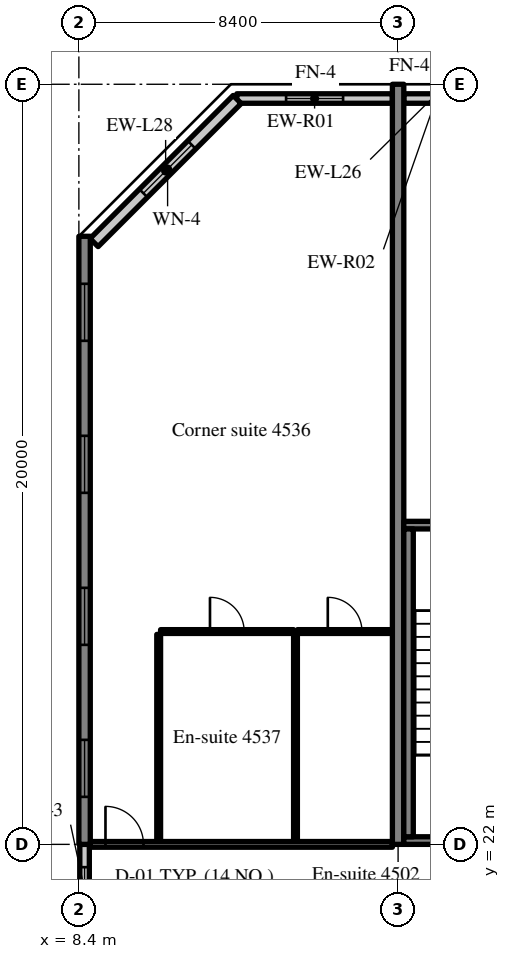
"""IFC4 building model, lengths in metres.
Left out: names, types, materials, properties, quantities, classifications, styles, units other than length and angle.
Written with IfcOpenShell. Run it as: python <this file> out.ifc"""

import sys

from ifc_helpers import new_model, si_unit, direction, frame, frame_2d, origin, place, context, subcontext, project, spatial, rectangle, extrude, source, transform, mapped, element, fill, save


model = new_model("IFC4")
c1 = context("Model", 3, precision=1e-05, world=origin(), true_north=direction((0.0, 1.0)))
c2 = subcontext(c1, "Body", "Model", "MODEL_VIEW")
j1 = project(units=[si_unit("LENGTHUNIT", "METRE"), si_unit("PLANEANGLEUNIT", "RADIAN")], contexts=[c1])
p1 = place(None, origin())
s1 = spatial("IfcSite", under=j1, at=p1, CompositionType="ELEMENT")
p2 = place(p1, origin())
s2 = spatial("IfcBuilding", under=s1, at=p2, CompositionType="ELEMENT")
p3 = place(p2, frame((0.0, 0.0, 185.8)))
s3 = spatial("IfcBuildingStorey", under=s2, at=p3, CompositionType="ELEMENT", Elevation=185.8)
m1 = source(origin(), c2, "Body", "SweptSolid", [
    extrude(rectangle(XDim=16.0, YDim=0.3, at=frame_2d((8.0, 0.0))), origin(), (0.0, 0.0, 1.0), 3.52),
])
p4 = place(p3, frame((8.55, 22.0, 0.0), z_axis=(0.0, 0.0, 1.0), x_axis=(0.0, 1.0, 0.0)))
e1 = element("IfcWall", 1, at=p4, inside=s3, PredefinedType="SHEAR", context=c2, shape_type="MappedRepresentation", body=[
    mapped(m1, transform((0.0, 0.0, 0.0), scale=1.0)),
])
m2 = source(origin(), c2, "Body", "SweptSolid", [
    extrude(rectangle(XDim=1.5, YDim=1.5, at=frame_2d((0.75, 0.75))), frame((0.0, 0.16, 0.0), z_axis=(0.0, -1.0, 0.0), x_axis=(1.0, 0.0, 0.0)), (0.0, 0.0, 1.0), 0.32),
])
p5 = place(p4, frame((1.25, 0.0, 0.9)))
e2 = element("IfcOpeningElement", 2, at=p5, cuts=e1, PredefinedType="OPENING", context=c2, shape_type="MappedRepresentation", body=[
    mapped(m2, transform((0.0, 0.0, 0.0), scale=1.0)),
])
p6 = place(p4, frame((5.25, 0.0, 0.9)))
e3 = element("IfcOpeningElement", 3, at=p6, cuts=e1, PredefinedType="OPENING", context=c2, shape_type="MappedRepresentation", body=[
    mapped(m2, transform((0.0, 0.0, 0.0), scale=1.0)),
])
p7 = place(p4, frame((9.25, 0.0, 0.9)))
e4 = element("IfcOpeningElement", 4, at=p7, cuts=e1, PredefinedType="OPENING", context=c2, shape_type="MappedRepresentation", body=[
    mapped(m2, transform((0.0, 0.0, 0.0), scale=1.0)),
])
p8 = place(p4, frame((13.25, 0.0, 0.9)))
e5 = element("IfcOpeningElement", 5, at=p8, cuts=e1, PredefinedType="OPENING", context=c2, shape_type="MappedRepresentation", body=[
    mapped(m2, transform((0.0, 0.0, 0.0), scale=1.0)),
])
m3 = source(origin(), c2, "Body", "SweptSolid", [
    extrude(rectangle(XDim=20.0, YDim=0.3, at=frame_2d((10.0, 0.0))), origin(), (0.0, 0.0, 1.0), 3.52),
])
p9 = place(p3, frame((16.8, 22.0, 0.0), z_axis=(0.0, 0.0, 1.0), x_axis=(0.0, 1.0, 0.0)))
e6 = element("IfcWall", 6, at=p9, inside=s3, PredefinedType="SHEAR", context=c2, shape_type="MappedRepresentation", body=[
    mapped(m3, transform((0.0, 0.0, 0.0), scale=1.0)),
])
m4 = source(origin(), c2, "Body", "SweptSolid", [
    extrude(rectangle(XDim=4.094, YDim=0.25, at=frame_2d((2.047, 0.0))), origin(), (0.0, 0.0, 1.0), 2.87),
])
p10 = place(p3, frame((16.65, 41.625, 0.0), z_axis=(0.0, 0.0, 1.0), x_axis=(-1.0, 0.0, 0.0)))
e7 = element("IfcWall", 7, at=p10, inside=s3, PredefinedType="SOLIDWALL", context=c2, shape_type="MappedRepresentation", body=[
    mapped(m4, transform((0.0, 0.0, 0.0), scale=1.0)),
])
m5 = source(origin(), c2, "Body", "SweptSolid", [
    extrude(rectangle(XDim=1.5, YDim=1.5, at=frame_2d((0.75, 0.75))), frame((0.0, 0.135, 0.0), z_axis=(0.0, -1.0, 0.0), x_axis=(1.0, 0.0, 0.0)), (0.0, 0.0, 1.0), 0.27),
])
p11 = place(p10, frame((1.297, 0.0, 0.9)))
e8 = element("IfcOpeningElement", 8, at=p11, cuts=e7, PredefinedType="OPENING", context=c2, shape_type="MappedRepresentation", body=[
    mapped(m5, transform((0.0, 0.0, 0.0), scale=1.0)),
])
m6 = source(origin(), c2, "Body", "SweptSolid", [
    extrude(rectangle(XDim=1.708, YDim=0.25, at=frame_2d((0.854, 0.0))), origin(), (0.0, 0.0, 1.0), 2.87),
])
p12 = place(p3, frame((18.658, 41.625, 0.0), z_axis=(0.0, 0.0, 1.0), x_axis=(-1.0, 0.0, 0.0)))
e9 = element("IfcWall", 9, at=p12, inside=s3, PredefinedType="SOLIDWALL", context=c2, shape_type="MappedRepresentation", body=[
    mapped(m6, transform((0.0, 0.0, 0.0), scale=1.0)),
])
m7 = source(origin(), c2, "Body", "SweptSolid", [
    extrude(rectangle(XDim=5.326, YDim=0.3, at=frame_2d((2.663, 0.0))), origin(), (0.0, 0.0, 1.0), 3.52),
])
p13 = place(p3, frame((12.566, 41.6, 0.0), z_axis=(0.0, 0.0, 1.0), x_axis=(-0.707083859269, -0.707129702361, 0.0)))
e10 = element("IfcWall", 10, at=p13, inside=s3, PredefinedType="SOLIDWALL", context=c2, shape_type="MappedRepresentation", body=[
    mapped(m7, transform((0.0, 0.0, 0.0), scale=1.0)),
])
m8 = source(origin(), c2, "Body", "SweptSolid", [
    extrude(rectangle(XDim=1.8, YDim=1.5, at=frame_2d((0.9, 0.75))), frame((0.0, 0.16, 0.0), z_axis=(0.0, -1.0, 0.0), x_axis=(1.0, 0.0, 0.0)), (0.0, 0.0, 1.0), 0.32),
])
p14 = place(p13, frame((1.689, 0.0, 0.9)))
e11 = element("IfcOpeningElement", 11, at=p14, cuts=e10, PredefinedType="OPENING", context=c2, shape_type="MappedRepresentation", body=[
    mapped(m8, transform((0.0, 0.0, 0.0), scale=1.0)),
])
m9 = source(origin(), c2, "Body", "SweptSolid", [
    extrude(rectangle(XDim=2.4, YDim=0.25, at=frame_2d((1.2, 0.0))), origin(), (0.0, 0.0, 1.0), 2.62),
])
p15 = place(p3, frame((8.55, 19.6, 0.0), z_axis=(0.0, 0.0, 1.0), x_axis=(0.0, 1.0, 0.0)))
e12 = element("IfcWall", 12, at=p15, inside=s3, PredefinedType="SOLIDWALL", context=c2, shape_type="MappedRepresentation", body=[
    mapped(m9, transform((0.0, 0.0, 0.0), scale=1.0)),
])
m10 = source(origin(), c2, "Body", "SweptSolid", [
    extrude(rectangle(XDim=1.2, YDim=1.5, at=frame_2d((0.6, 0.75))), frame((0.0, 0.135, 0.0), z_axis=(0.0, -1.0, 0.0), x_axis=(1.0, 0.0, 0.0)), (0.0, 0.0, 1.0), 0.27),
])
p16 = place(p15, frame((0.6, 0.0, 0.9)))
e13 = element("IfcOpeningElement", 13, at=p16, cuts=e12, PredefinedType="OPENING", context=c2, shape_type="MappedRepresentation", body=[
    mapped(m10, transform((0.0, 0.0, 0.0), scale=1.0)),
])
m11 = source(origin(), c2, "Body", "SweptSolid", [
    extrude(rectangle(XDim=8.25, YDim=0.2, at=frame_2d((4.125, 0.0))), origin(), (0.0, 0.0, 1.0), 3.52),
])
p17 = place(p3, frame((16.95, 22.1, 0.0), z_axis=(0.0, 0.0, 1.0), x_axis=(1.0, 0.0, 0.0)))
e14 = element("IfcWall", 14, at=p17, inside=s3, PredefinedType="SOLIDWALL", context=c2, shape_type="MappedRepresentation", body=[
    mapped(m11, transform((0.0, 0.0, 0.0), scale=1.0)),
])
m12 = source(origin(), c2, "Body", "SweptSolid", [
    extrude(rectangle(XDim=1.2, YDim=2.1, at=frame_2d((0.6, 1.05))), frame((0.0, 0.11, 0.0), z_axis=(0.0, -1.0, 0.0), x_axis=(1.0, 0.0, 0.0)), (0.0, 0.0, 1.0), 0.22),
])
p18 = place(p17, frame((6.05, 0.0, 0.0)))
e15 = element("IfcOpeningElement", 15, at=p18, cuts=e14, PredefinedType="OPENING", context=c2, shape_type="MappedRepresentation", body=[
    mapped(m12, transform((0.0, 0.0, 0.0), scale=1.0)),
])
p19 = place(p3, frame((16.95, 30.4, 0.0), z_axis=(0.0, 0.0, 1.0), x_axis=(1.0, 0.0, 0.0)))
e16 = element("IfcWall", 16, at=p19, inside=s3, PredefinedType="SOLIDWALL", context=c2, shape_type="MappedRepresentation", body=[
    mapped(m11, transform((0.0, 0.0, 0.0), scale=1.0)),
])
m13 = source(origin(), c2, "Body", "SweptSolid", [
    extrude(rectangle(XDim=1.0, YDim=2.1, at=frame_2d((0.5, 1.05))), frame((0.0, 0.11, 0.0), z_axis=(0.0, -1.0, 0.0), x_axis=(1.0, 0.0, 0.0)), (0.0, 0.0, 1.0), 0.22),
])
p20 = place(p19, frame((6.15, 0.0, 0.0)))
e17 = element("IfcOpeningElement", 17, at=p20, cuts=e16, PredefinedType="OPENING", context=c2, shape_type="MappedRepresentation", body=[
    mapped(m13, transform((0.0, 0.0, 0.0), scale=1.0)),
])
m14 = source(origin(), c2, "Body", "SweptSolid", [
    extrude(rectangle(XDim=8.1, YDim=0.25, at=frame_2d((4.05, 0.0))), origin(), (0.0, 0.0, 1.0), 3.52),
])
p21 = place(p3, frame((17.075, 22.2, 0.0), z_axis=(0.0, 0.0, 1.0), x_axis=(0.0, 1.0, 0.0)))
e18 = element("IfcWall", 18, at=p21, inside=s3, PredefinedType="SOLIDWALL", context=c2, shape_type="MappedRepresentation", body=[
    mapped(m14, transform((0.0, 0.0, 0.0), scale=1.0)),
])
m15 = source(origin(), c2, "Body", "SweptSolid", [
    extrude(rectangle(XDim=5.45, YDim=0.1, at=frame_2d((2.725, 0.0))), origin(), (0.0, 0.0, 1.0), 3.52),
])
for number, where, z_axis, x_axis in (
    (19, (10.5, 22.075, 0.0), (0.0, 0.0, 1.0), (0.0, 1.0, 0.0)),
    (20, (14.1, 22.075, 0.0), (0.0, 0.0, 1.0), (0.0, 1.0, 0.0)),
):
    element("IfcWall", number, at=place(p3, frame(where, z_axis=z_axis, x_axis=x_axis)), inside=s3, PredefinedType="PARTITIONING", context=c2, shape_type="MappedRepresentation", body=[
        mapped(m15, transform((0.0, 0.0, 0.0), scale=1.0)),
    ])
m16 = source(origin(), c2, "Body", "SweptSolid", [
    extrude(rectangle(XDim=3.5, YDim=0.1, at=frame_2d((1.75, 0.0))), origin(), (0.0, 0.0, 1.0), 3.52),
])
p22 = place(p3, frame((10.55, 27.6, 0.0), z_axis=(0.0, 0.0, 1.0), x_axis=(1.0, 0.0, 0.0)))
e21 = element("IfcWall", 21, at=p22, inside=s3, PredefinedType="PARTITIONING", context=c2, shape_type="MappedRepresentation", body=[
    mapped(m16, transform((0.0, 0.0, 0.0), scale=1.0)),
])
m17 = source(origin(), c2, "Body", "SweptSolid", [
    extrude(rectangle(XDim=0.9, YDim=2.1, at=frame_2d((0.45, 1.05))), frame((0.0, 0.06, 0.0), z_axis=(0.0, -1.0, 0.0), x_axis=(1.0, 0.0, 0.0)), (0.0, 0.0, 1.0), 0.12),
])
p23 = place(p22, frame((1.3, 0.0, 0.0)))
e22 = element("IfcOpeningElement", 22, at=p23, cuts=e21, PredefinedType="OPENING", context=c2, shape_type="MappedRepresentation", body=[
    mapped(m17, transform((0.0, 0.0, 0.0), scale=1.0)),
])
m18 = source(origin(), c2, "Body", "SweptSolid", [
    extrude(rectangle(XDim=2.5, YDim=0.1, at=frame_2d((1.25, 0.0))), origin(), (0.0, 0.0, 1.0), 3.52),
])
p24 = place(p3, frame((14.15, 27.6, 0.0), z_axis=(0.0, 0.0, 1.0), x_axis=(1.0, 0.0, 0.0)))
e23 = element("IfcWall", 23, at=p24, inside=s3, PredefinedType="PARTITIONING", context=c2, shape_type="MappedRepresentation", body=[
    mapped(m18, transform((0.0, 0.0, 0.0), scale=1.0)),
])
p25 = place(p24, frame((0.8, 0.0, 0.0)))
e24 = element("IfcOpeningElement", 24, at=p25, cuts=e23, PredefinedType="OPENING", context=c2, shape_type="MappedRepresentation", body=[
    mapped(m17, transform((0.0, 0.0, 0.0), scale=1.0)),
])
m19 = source(origin(), c2, "Body", "SweptSolid", [
    extrude(rectangle(XDim=7.95, YDim=0.15, at=frame_2d((3.975, 0.0))), origin(), (0.0, 0.0, 1.0), 2.82),
])
p26 = place(p3, frame((8.7, 22.0, 0.0), z_axis=(0.0, 0.0, 1.0), x_axis=(1.0, 0.0, 0.0)))
e25 = element("IfcWall", 25, at=p26, inside=s3, PredefinedType="PARTITIONING", context=c2, shape_type="MappedRepresentation", body=[
    mapped(m19, transform((0.0, 0.0, 0.0), scale=1.0)),
])
m20 = source(origin(), c2, "Body", "SweptSolid", [
    extrude(rectangle(XDim=1.0, YDim=2.1, at=frame_2d((0.5, 1.05))), frame((0.0, 0.085, 0.0), z_axis=(0.0, -1.0, 0.0), x_axis=(1.0, 0.0, 0.0)), (0.0, 0.0, 1.0), 0.17),
])
p27 = place(p26, frame((0.4, 0.0, 0.0)))
e26 = element("IfcOpeningElement", 26, at=p27, cuts=e25, PredefinedType="OPENING", context=c2, shape_type="MappedRepresentation", body=[
    mapped(m20, transform((0.0, 0.0, 0.0), scale=1.0)),
])
m21 = source(origin(), c2, "Body", "SweptSolid", [
    extrude(rectangle(XDim=1.5, YDim=1.5, at=frame_2d((0.75, 0.75))), frame((0.0, 0.03, 0.0), z_axis=(0.0, -1.0, 0.0), x_axis=(1.0, 0.0, 0.0)), (0.0, 0.0, 1.0), 0.06),
])
p28 = place(p11, origin())
e27 = element("IfcWindow", 27, at=p28, inside=s3, PartitioningType="SINGLE_PANEL", PredefinedType="WINDOW", context=c2, shape_type="MappedRepresentation", body=[
    mapped(m21, transform((0.0, 0.0, 0.0), scale=1.0)),
])
fill(e8, e27)
m22 = source(origin(), c2, "Body", "SweptSolid", [
    extrude(rectangle(XDim=1.8, YDim=1.5, at=frame_2d((0.9, 0.75))), frame((0.0, 0.03, 0.0), z_axis=(0.0, -1.0, 0.0), x_axis=(1.0, 0.0, 0.0)), (0.0, 0.0, 1.0), 0.06),
])
p29 = place(p14, origin())
e28 = element("IfcWindow", 28, at=p29, inside=s3, PartitioningType="SINGLE_PANEL", PredefinedType="WINDOW", context=c2, shape_type="MappedRepresentation", body=[
    mapped(m22, transform((0.0, 0.0, 0.0), scale=1.0)),
])
fill(e11, e28)
p30 = place(p5, origin())
e29 = element("IfcWindow", 29, at=p30, inside=s3, PartitioningType="SINGLE_PANEL", PredefinedType="WINDOW", context=c2, shape_type="MappedRepresentation", body=[
    mapped(m21, transform((0.0, 0.0, 0.0), scale=1.0)),
])
fill(e2, e29)
p31 = place(p6, origin())
e30 = element("IfcWindow", 30, at=p31, inside=s3, PartitioningType="SINGLE_PANEL", PredefinedType="WINDOW", context=c2, shape_type="MappedRepresentation", body=[
    mapped(m21, transform((0.0, 0.0, 0.0), scale=1.0)),
])
fill(e3, e30)
p32 = place(p7, origin())
e31 = element("IfcWindow", 31, at=p32, inside=s3, PartitioningType="SINGLE_PANEL", PredefinedType="WINDOW", context=c2, shape_type="MappedRepresentation", body=[
    mapped(m21, transform((0.0, 0.0, 0.0), scale=1.0)),
])
fill(e4, e31)
p33 = place(p8, origin())
e32 = element("IfcWindow", 32, at=p33, inside=s3, PartitioningType="SINGLE_PANEL", PredefinedType="WINDOW", context=c2, shape_type="MappedRepresentation", body=[
    mapped(m21, transform((0.0, 0.0, 0.0), scale=1.0)),
])
fill(e5, e32)
m23 = source(origin(), c2, "Body", "SweptSolid", [
    extrude(rectangle(XDim=1.2, YDim=1.5, at=frame_2d((0.6, 0.75))), frame((0.0, 0.03, 0.0), z_axis=(0.0, -1.0, 0.0), x_axis=(1.0, 0.0, 0.0)), (0.0, 0.0, 1.0), 0.06),
])
p34 = place(p16, origin())
e33 = element("IfcWindow", 33, at=p34, inside=s3, PartitioningType="SINGLE_PANEL", PredefinedType="WINDOW", context=c2, shape_type="MappedRepresentation", body=[
    mapped(m23, transform((0.0, 0.0, 0.0), scale=1.0)),
])
fill(e13, e33)
m24 = source(origin(), c2, "Body", "SweptSolid", [
    extrude(rectangle(XDim=0.9, YDim=2.1, at=frame_2d((0.45, 1.05))), frame((0.0, 0.025, 0.0), z_axis=(0.0, -1.0, 0.0), x_axis=(1.0, 0.0, 0.0)), (0.0, 0.0, 1.0), 0.05),
])
p35 = place(p23, origin())
e34 = element("IfcDoor", 34, at=p35, inside=s3, OperationType="SINGLE_SWING_LEFT", PredefinedType="DOOR", context=c2, shape_type="MappedRepresentation", body=[
    mapped(m24, transform((0.0, 0.0, 0.0), scale=1.0)),
])
fill(e22, e34)
p36 = place(p25, origin())
e35 = element("IfcDoor", 35, at=p36, inside=s3, OperationType="SINGLE_SWING_LEFT", PredefinedType="DOOR", context=c2, shape_type="MappedRepresentation", body=[
    mapped(m24, transform((0.0, 0.0, 0.0), scale=1.0)),
])
fill(e24, e35)
m25 = source(origin(), c2, "Body", "SweptSolid", [
    extrude(rectangle(XDim=1.0, YDim=2.1, at=frame_2d((0.5, 1.05))), frame((0.0, 0.025, 0.0), z_axis=(0.0, -1.0, 0.0), x_axis=(1.0, 0.0, 0.0)), (0.0, 0.0, 1.0), 0.05),
])
p37 = place(p27, origin())
e36 = element("IfcDoor", 36, at=p37, inside=s3, OperationType="SINGLE_SWING_LEFT", PredefinedType="DOOR", context=c2, shape_type="MappedRepresentation", body=[
    mapped(m25, transform((0.0, 0.0, 0.0), scale=1.0)),
])
fill(e26, e36)
save(model, sys.argv[1])
